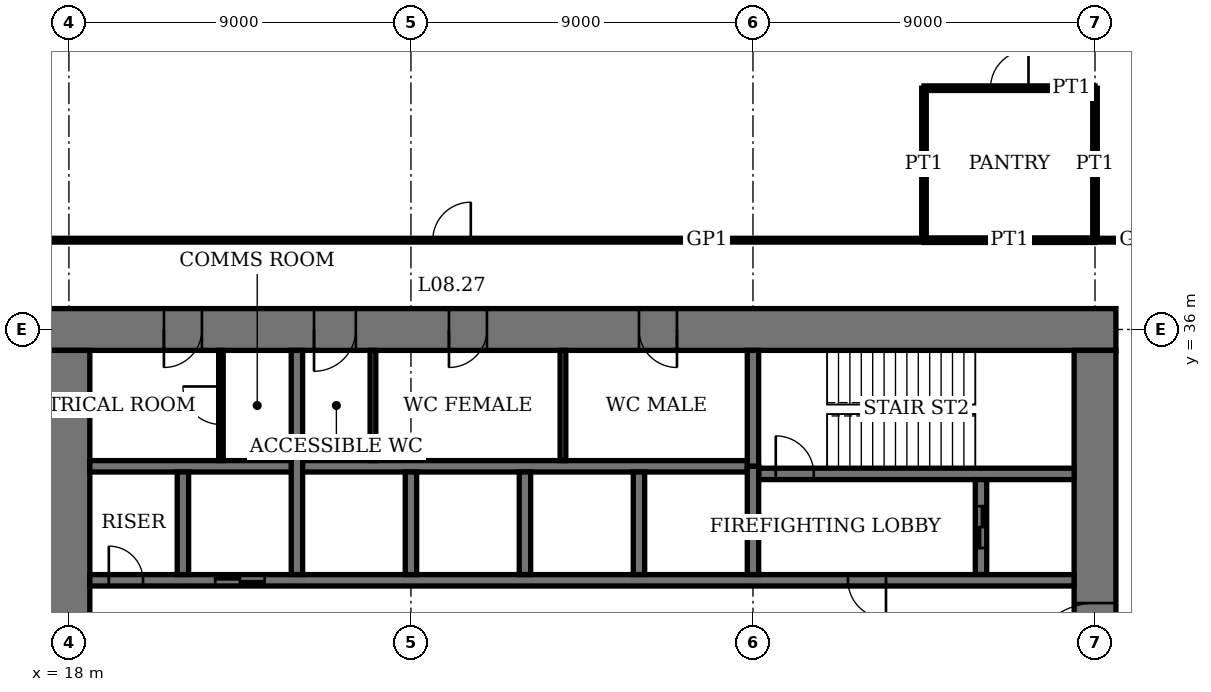
"""IFC4 building model, lengths in metres.
Left out: names, types, materials, properties, quantities, classifications, styles, units other than length and angle.
Written with IfcOpenShell. Run it as: python <this file> out.ifc"""

import sys

from ifc_helpers import new_model, si_unit, direction, frame, frame_2d, origin, place, context, subcontext, project, spatial, rectangle, extrude, element, fill, save


model = new_model("IFC4")
c1 = context("Model", 3, precision=1e-05, world=origin(), true_north=direction((0.0, 1.0)))
c2 = subcontext(c1, "Body", "Model", "MODEL_VIEW")
j1 = project(units=[si_unit("LENGTHUNIT", "METRE"), si_unit("PLANEANGLEUNIT", "RADIAN")], contexts=[c1])
p1 = place(None, origin())
s1 = spatial("IfcSite", under=j1, at=p1, CompositionType="ELEMENT")
p2 = place(p1, origin())
s2 = spatial("IfcBuilding", under=s1, at=p2, CompositionType="ELEMENT")
p3 = place(p2, frame((0.0, 0.0, 35.8)))
s3 = spatial("IfcBuildingStorey", under=s2, at=p3, CompositionType="ELEMENT", Elevation=35.8)
p4 = place(p3, frame((45.55, 36.0, 0.0), z_axis=(0.0, 0.0, 1.0), x_axis=(-1.0, 0.0, 0.0)))
e1 = element("IfcWall", 1, at=p4, inside=s3, PredefinedType="SHEAR", context=c2, shape_type="SweptSolid", body=[
    extrude(rectangle(XDim=28.1, YDim=1.1, at=frame_2d((14.05, 0.0))), origin(), (0.0, 0.0, 1.0), 4.0),
])
p5 = place(p4, frame((11.55, 0.0, 0.0)))
e2 = element("IfcOpeningElement", 2, at=p5, cuts=e1, PredefinedType="OPENING", context=c2, shape_type="SweptSolid", body=[
    extrude(rectangle(XDim=1.0, YDim=2.4, at=frame_2d((0.5, 1.2))), frame((0.0, 0.56, 0.0), z_axis=(0.0, -1.0, 0.0), x_axis=(1.0, 0.0, 0.0)), (0.0, 0.0, 1.0), 1.12),
])
p6 = place(p4, frame((16.55, 0.0, 0.0)))
e3 = element("IfcOpeningElement", 3, at=p6, cuts=e1, PredefinedType="OPENING", context=c2, shape_type="SweptSolid", body=[
    extrude(rectangle(XDim=1.0, YDim=2.4, at=frame_2d((0.5, 1.2))), frame((0.0, 0.56, 0.0), z_axis=(0.0, -1.0, 0.0), x_axis=(1.0, 0.0, 0.0)), (0.0, 0.0, 1.0), 1.12),
])
p7 = place(p4, frame((20.0, 0.0, 0.0)))
e4 = element("IfcOpeningElement", 4, at=p7, cuts=e1, PredefinedType="OPENING", context=c2, shape_type="SweptSolid", body=[
    extrude(rectangle(XDim=1.1, YDim=2.4, at=frame_2d((0.55, 1.2))), frame((0.0, 0.56, 0.0), z_axis=(0.0, -1.0, 0.0), x_axis=(1.0, 0.0, 0.0)), (0.0, 0.0, 1.0), 1.12),
])
p8 = place(p4, frame((24.05, 0.0, 0.0)))
e5 = element("IfcOpeningElement", 5, at=p8, cuts=e1, PredefinedType="OPENING", context=c2, shape_type="SweptSolid", body=[
    extrude(rectangle(XDim=1.0, YDim=2.4, at=frame_2d((0.5, 1.2))), frame((0.0, 0.56, 0.0), z_axis=(0.0, -1.0, 0.0), x_axis=(1.0, 0.0, 0.0)), (0.0, 0.0, 1.0), 1.12),
])
p9 = place(p3, frame((18.0, 35.45, 0.0), z_axis=(0.0, 0.0, 1.0), x_axis=(0.0, -1.0, 0.0)))
e6 = element("IfcWall", 6, at=p9, inside=s3, PredefinedType="SHEAR", context=c2, shape_type="SweptSolid", body=[
    extrude(rectangle(XDim=16.9, YDim=1.1, at=frame_2d((8.45, 0.0))), origin(), (0.0, 0.0, 1.0), 4.0),
])
p10 = place(p9, frame((8.45, 0.0, 0.0)))
e7 = element("IfcOpeningElement", 7, at=p10, cuts=e6, PredefinedType="OPENING", context=c2, shape_type="SweptSolid", body=[
    extrude(rectangle(XDim=1.8, YDim=2.4, at=frame_2d((0.9, 1.2))), frame((0.0, 0.56, 0.0), z_axis=(0.0, -1.0, 0.0), x_axis=(1.0, 0.0, 0.0)), (0.0, 0.0, 1.0), 1.12),
])
p11 = place(p3, frame((45.0, 18.55, 0.0), z_axis=(0.0, 0.0, 1.0), x_axis=(0.0, 1.0, 0.0)))
e8 = element("IfcWall", 8, at=p11, inside=s3, PredefinedType="SHEAR", context=c2, shape_type="SweptSolid", body=[
    extrude(rectangle(XDim=16.9, YDim=1.1, at=frame_2d((8.45, 0.0))), origin(), (0.0, 0.0, 1.0), 4.0),
])
p12 = place(p11, frame((8.45, 0.0, 0.0)))
e9 = element("IfcOpeningElement", 9, at=p12, cuts=e8, PredefinedType="OPENING", context=c2, shape_type="SweptSolid", body=[
    extrude(rectangle(XDim=1.8, YDim=2.4, at=frame_2d((0.9, 1.2))), frame((0.0, 0.56, 0.0), z_axis=(0.0, -1.0, 0.0), x_axis=(1.0, 0.0, 0.0)), (0.0, 0.0, 1.0), 1.12),
])
p13 = place(p3, frame((36.15, 32.2, 0.0), z_axis=(0.0, 0.0, 1.0), x_axis=(1.0, 0.0, 0.0)))
e10 = element("IfcWall", 10, at=p13, inside=s3, PredefinedType="SHEAR", context=c2, shape_type="SweptSolid", body=[
    extrude(rectangle(XDim=8.3, YDim=0.3, at=frame_2d((4.15, 0.0))), origin(), (0.0, 0.0, 1.0), 4.0),
])
p14 = place(p13, frame((0.45, 0.0, 0.0)))
e11 = element("IfcOpeningElement", 11, at=p14, cuts=e10, PredefinedType="OPENING", context=c2, shape_type="SweptSolid", body=[
    extrude(rectangle(XDim=1.0, YDim=2.4, at=frame_2d((0.5, 1.2))), frame((0.0, 0.16, 0.0), z_axis=(0.0, -1.0, 0.0), x_axis=(1.0, 0.0, 0.0)), (0.0, 0.0, 1.0), 0.32),
])
p15 = place(p3, frame((36.0, 32.4, 0.0), z_axis=(0.0, 0.0, 1.0), x_axis=(0.0, 1.0, 0.0)))
e12 = element("IfcWall", 12, at=p15, inside=s3, PredefinedType="SHEAR", context=c2, shape_type="SweptSolid", body=[
    extrude(rectangle(XDim=3.05, YDim=0.3, at=frame_2d((1.525, 0.0))), origin(), (0.0, 0.0, 1.0), 4.0),
])
p16 = place(p3, frame((42.0, 29.55, 0.0), z_axis=(0.0, 0.0, 1.0), x_axis=(0.0, 1.0, 0.0)))
e13 = element("IfcWall", 13, at=p16, inside=s3, PredefinedType="SHEAR", context=c2, shape_type="SweptSolid", body=[
    extrude(rectangle(XDim=2.5, YDim=0.3, at=frame_2d((1.25, 0.0))), origin(), (0.0, 0.0, 1.0), 4.0),
])
p17 = place(p16, frame((0.7, 0.0, 0.0)))
e14 = element("IfcOpeningElement", 14, at=p17, cuts=e13, PredefinedType="OPENING", context=c2, shape_type="SweptSolid", body=[
    extrude(rectangle(XDim=1.1, YDim=2.4, at=frame_2d((0.55, 1.2))), frame((0.0, 0.16, 0.0), z_axis=(0.0, -1.0, 0.0), x_axis=(1.0, 0.0, 0.0)), (0.0, 0.0, 1.0), 0.32),
])
p18 = place(p3, frame((18.55, 29.4, 0.0), z_axis=(0.0, 0.0, 1.0), x_axis=(1.0, 0.0, 0.0)))
e15 = element("IfcWall", 15, at=p18, inside=s3, PredefinedType="SHEAR", context=c2, shape_type="SweptSolid", body=[
    extrude(rectangle(XDim=25.9, YDim=0.3, at=frame_2d((12.95, 0.0))), origin(), (0.0, 0.0, 1.0), 4.0),
])
p19 = place(p18, frame((19.95, 0.0, 0.0)))
e16 = element("IfcOpeningElement", 16, at=p19, cuts=e15, PredefinedType="OPENING", context=c2, shape_type="SweptSolid", body=[
    extrude(rectangle(XDim=1.0, YDim=2.4, at=frame_2d((0.5, 1.2))), frame((0.0, 0.16, 0.0), z_axis=(0.0, -1.0, 0.0), x_axis=(1.0, 0.0, 0.0)), (0.0, 0.0, 1.0), 0.32),
])
p20 = place(p18, frame((0.5, 0.0, 0.0)))
e17 = element("IfcOpeningElement", 17, at=p20, cuts=e15, PredefinedType="OPENING", context=c2, shape_type="SweptSolid", body=[
    extrude(rectangle(XDim=0.9, YDim=2.1, at=frame_2d((0.45, 1.05))), frame((0.0, 0.16, 0.0), z_axis=(0.0, -1.0, 0.0), x_axis=(1.0, 0.0, 0.0)), (0.0, 0.0, 1.0), 0.32),
])
p21 = place(p18, frame((3.3, 0.0, 0.0)))
e18 = element("IfcOpeningElement", 18, at=p21, cuts=e15, PredefinedType="OPENING", context=c2, shape_type="SweptSolid", body=[
    extrude(rectangle(XDim=1.3, YDim=2.4, at=frame_2d((0.65, 1.2))), frame((0.0, 0.16, 0.0), z_axis=(0.0, -1.0, 0.0), x_axis=(1.0, 0.0, 0.0)), (0.0, 0.0, 1.0), 0.32),
])
p22 = place(p3, frame((18.55, 32.4, 0.0), z_axis=(0.0, 0.0, 1.0), x_axis=(1.0, 0.0, 0.0)))
e19 = element("IfcWall", 19, at=p22, inside=s3, PredefinedType="SHEAR", context=c2, shape_type="SweptSolid", body=[
    extrude(rectangle(XDim=17.3, YDim=0.3, at=frame_2d((8.65, 0.0))), origin(), (0.0, 0.0, 1.0), 4.0),
])
for number, where, z_axis, x_axis in (
    (20, (33.0, 29.55, 0.0), (0.0, 0.0, 1.0), (0.0, 1.0, 0.0)),
    (21, (30.0, 29.55, 0.0), (0.0, 0.0, 1.0), (0.0, 1.0, 0.0)),
    (22, (27.0, 29.55, 0.0), (0.0, 0.0, 1.0), (0.0, 1.0, 0.0)),
):
    element("IfcWall", number, at=place(p3, frame(where, z_axis=z_axis, x_axis=x_axis)), inside=s3, PredefinedType="SHEAR", context=c2, shape_type="SweptSolid", body=[
        extrude(rectangle(XDim=2.7, YDim=0.3, at=frame_2d((1.35, 0.0))), origin(), (0.0, 0.0, 1.0), 4.0),
    ])
p23 = place(p3, frame((24.0, 29.55, 0.0), z_axis=(0.0, 0.0, 1.0), x_axis=(0.0, 1.0, 0.0)))
e23 = element("IfcWall", 23, at=p23, inside=s3, PredefinedType="SHEAR", context=c2, shape_type="SweptSolid", body=[
    extrude(rectangle(XDim=5.9, YDim=0.3, at=frame_2d((2.95, 0.0))), origin(), (0.0, 0.0, 1.0), 4.0),
])
p24 = place(p3, frame((21.0, 29.55, 0.0), z_axis=(0.0, 0.0, 1.0), x_axis=(0.0, 1.0, 0.0)))
e24 = element("IfcWall", 24, at=p24, inside=s3, PredefinedType="SHEAR", context=c2, shape_type="SweptSolid", body=[
    extrude(rectangle(XDim=2.7, YDim=0.3, at=frame_2d((1.35, 0.0))), origin(), (0.0, 0.0, 1.0), 4.0),
])
p25 = place(p3, frame((36.0, 29.55, 0.0), z_axis=(0.0, 0.0, 1.0), x_axis=(0.0, 1.0, 0.0)))
e25 = element("IfcWall", 25, at=p25, inside=s3, PredefinedType="SHEAR", context=c2, shape_type="SweptSolid", body=[
    extrude(rectangle(XDim=2.85, YDim=0.3, at=frame_2d((1.425, 0.0))), origin(), (0.0, 0.0, 1.0), 4.0),
])
p26 = place(p3, frame((40.5, 38.35, 0.0), z_axis=(0.0, 0.0, 1.0), x_axis=(1.0, 0.0, 0.0)))
e26 = element("IfcWall", 26, at=p26, inside=s3, PredefinedType="PARTITIONING", context=c2, shape_type="SweptSolid", body=[
    extrude(rectangle(XDim=4.5, YDim=0.12, at=frame_2d((2.25, 0.0))), origin(), (0.0, 0.0, 1.0), 3.75),
])
p27 = place(p3, frame((15.65, 38.35, 0.0), z_axis=(0.0, 0.0, 1.0), x_axis=(1.0, 0.0, 0.0)))
e27 = element("IfcWall", 27, at=p27, inside=s3, PredefinedType="PARTITIONING", context=c2, shape_type="SweptSolid", body=[
    extrude(rectangle(XDim=24.85, YDim=0.1, at=frame_2d((12.425, 0.0))), origin(), (0.0, 0.0, 1.0), 3.75),
])
p28 = place(p27, frame((11.925, 0.0, 0.0)))
e28 = element("IfcOpeningElement", 28, at=p28, cuts=e27, PredefinedType="OPENING", context=c2, shape_type="SweptSolid", body=[
    extrude(rectangle(XDim=1.0, YDim=2.4, at=frame_2d((0.5, 1.2))), frame((0.0, 0.06, 0.0), z_axis=(0.0, -1.0, 0.0), x_axis=(1.0, 0.0, 0.0)), (0.0, 0.0, 1.0), 0.12),
])
p29 = place(p3, frame((45.0, 38.35, 0.0), z_axis=(0.0, 0.0, 1.0), x_axis=(1.0, 0.0, 0.0)))
e29 = element("IfcWall", 29, at=p29, inside=s3, PredefinedType="PARTITIONING", context=c2, shape_type="SweptSolid", body=[
    extrude(rectangle(XDim=2.35, YDim=0.1, at=frame_2d((1.175, 0.0))), origin(), (0.0, 0.0, 1.0), 3.75),
])
p30 = place(p3, frame((40.5, 42.35, 0.0), z_axis=(0.0, 0.0, 1.0), x_axis=(1.0, 0.0, 0.0)))
e30 = element("IfcWall", 30, at=p30, inside=s3, PredefinedType="PARTITIONING", context=c2, shape_type="SweptSolid", body=[
    extrude(rectangle(XDim=4.5, YDim=0.12, at=frame_2d((2.25, 0.0))), origin(), (0.0, 0.0, 1.0), 3.75),
])
p31 = place(p30, frame((1.75, 0.0, 0.0)))
e31 = element("IfcOpeningElement", 31, at=p31, cuts=e30, PredefinedType="OPENING", context=c2, shape_type="SweptSolid", body=[
    extrude(rectangle(XDim=1.0, YDim=2.4, at=frame_2d((0.5, 1.2))), frame((0.0, 0.07, 0.0), z_axis=(0.0, -1.0, 0.0), x_axis=(1.0, 0.0, 0.0)), (0.0, 0.0, 1.0), 0.14),
])
p32 = place(p3, frame((40.5, 38.35, 0.0), z_axis=(0.0, 0.0, 1.0), x_axis=(0.0, 1.0, 0.0)))
e32 = element("IfcWall", 32, at=p32, inside=s3, PredefinedType="PARTITIONING", context=c2, shape_type="SweptSolid", body=[
    extrude(rectangle(XDim=4.0, YDim=0.12, at=frame_2d((2.0, 0.0))), origin(), (0.0, 0.0, 1.0), 3.75),
])
p33 = place(p3, frame((45.0, 38.35, 0.0), z_axis=(0.0, 0.0, 1.0), x_axis=(0.0, 1.0, 0.0)))
e33 = element("IfcWall", 33, at=p33, inside=s3, PredefinedType="PARTITIONING", context=c2, shape_type="SweptSolid", body=[
    extrude(rectangle(XDim=4.0, YDim=0.12, at=frame_2d((2.0, 0.0))), origin(), (0.0, 0.0, 1.0), 3.05),
])
for number, where, z_axis, x_axis in (
    (34, (31.0, 32.55, 0.0), (0.0, 0.0, 1.0), (0.0, 1.0, 0.0)),
    (35, (26.0, 32.55, 0.0), (0.0, 0.0, 1.0), (0.0, 1.0, 0.0)),
):
    element("IfcWall", number, at=place(p3, frame(where, z_axis=z_axis, x_axis=x_axis)), inside=s3, PredefinedType="PARTITIONING", context=c2, shape_type="SweptSolid", body=[
        extrude(rectangle(XDim=2.9, YDim=0.15, at=frame_2d((1.45, 0.0))), origin(), (0.0, 0.0, 1.0), 3.75),
    ])
p34 = place(p3, frame((22.0, 32.55, 0.0), z_axis=(0.0, 0.0, 1.0), x_axis=(0.0, 1.0, 0.0)))
e36 = element("IfcWall", 36, at=p34, inside=s3, PredefinedType="PARTITIONING", context=c2, shape_type="SweptSolid", body=[
    extrude(rectangle(XDim=2.9, YDim=0.12, at=frame_2d((1.45, 0.0))), origin(), (0.0, 0.0, 1.0), 3.75),
])
p35 = place(p34, frame((0.95, 0.0, 0.0)))
e37 = element("IfcOpeningElement", 37, at=p35, cuts=e36, PredefinedType="OPENING", context=c2, shape_type="SweptSolid", body=[
    extrude(rectangle(XDim=1.0, YDim=2.4, at=frame_2d((0.5, 1.2))), frame((0.0, 0.07, 0.0), z_axis=(0.0, -1.0, 0.0), x_axis=(1.0, 0.0, 0.0)), (0.0, 0.0, 1.0), 0.14),
])
p36 = place(p12, origin())
e38 = element("IfcDoor", 38, at=p36, inside=s3, OperationType="DOUBLE_DOOR_DOUBLE_SWING", PredefinedType="DOOR", context=c2, shape_type="SweptSolid", body=[
    extrude(rectangle(XDim=1.8, YDim=2.4, at=frame_2d((0.9, 1.2))), frame((0.0, 0.03, 0.0), z_axis=(0.0, -1.0, 0.0), x_axis=(1.0, 0.0, 0.0)), (0.0, 0.0, 1.0), 0.06),
    extrude(rectangle(XDim=0.04, YDim=2.4, at=frame_2d((0.02, 1.2))), frame((0.0, 0.55, 0.0), z_axis=(0.0, -1.0, 0.0), x_axis=(1.0, 0.0, 0.0)), (0.0, 0.0, 1.0), 1.1),
    extrude(rectangle(XDim=0.04, YDim=2.4, at=frame_2d((1.78, 1.2))), frame((0.0, 0.55, 0.0), z_axis=(0.0, -1.0, 0.0), x_axis=(1.0, 0.0, 0.0)), (0.0, 0.0, 1.0), 1.1),
    extrude(rectangle(XDim=1.8, YDim=0.04, at=frame_2d((0.9, 2.38))), frame((0.0, 0.55, 0.0), z_axis=(0.0, -1.0, 0.0), x_axis=(1.0, 0.0, 0.0)), (0.0, 0.0, 1.0), 1.1),
])
fill(e9, e38)
p37 = place(p5, origin())
e39 = element("IfcDoor", 39, at=p37, inside=s3, OperationType="SINGLE_SWING_RIGHT", PredefinedType="DOOR", context=c2, shape_type="SweptSolid", body=[
    extrude(rectangle(XDim=1.0, YDim=2.4, at=frame_2d((0.5, 1.2))), frame((0.0, 0.025, 0.0), z_axis=(0.0, -1.0, 0.0), x_axis=(1.0, 0.0, 0.0)), (0.0, 0.0, 1.0), 0.05),
    extrude(rectangle(XDim=0.04, YDim=2.4, at=frame_2d((0.02, 1.2))), frame((0.0, 0.4, 0.0), z_axis=(0.0, -1.0, 0.0), x_axis=(1.0, 0.0, 0.0)), (0.0, 0.0, 1.0), 0.8),
    extrude(rectangle(XDim=0.04, YDim=2.4, at=frame_2d((0.98, 1.2))), frame((0.0, 0.4, 0.0), z_axis=(0.0, -1.0, 0.0), x_axis=(1.0, 0.0, 0.0)), (0.0, 0.0, 1.0), 0.8),
    extrude(rectangle(XDim=1.0, YDim=0.04, at=frame_2d((0.5, 2.38))), frame((0.0, 0.4, 0.0), z_axis=(0.0, -1.0, 0.0), x_axis=(1.0, 0.0, 0.0)), (0.0, 0.0, 1.0), 0.8),
])
fill(e2, e39)
p38 = place(p6, origin())
e40 = element("IfcDoor", 40, at=p38, inside=s3, OperationType="SINGLE_SWING_LEFT", PredefinedType="DOOR", context=c2, shape_type="SweptSolid", body=[
    extrude(rectangle(XDim=1.0, YDim=2.4, at=frame_2d((0.5, 1.2))), frame((0.0, 0.025, 0.0), z_axis=(0.0, -1.0, 0.0), x_axis=(1.0, 0.0, 0.0)), (0.0, 0.0, 1.0), 0.05),
    extrude(rectangle(XDim=0.04, YDim=2.4, at=frame_2d((0.02, 1.2))), frame((0.0, 0.4, 0.0), z_axis=(0.0, -1.0, 0.0), x_axis=(1.0, 0.0, 0.0)), (0.0, 0.0, 1.0), 0.8),
    extrude(rectangle(XDim=0.04, YDim=2.4, at=frame_2d((0.98, 1.2))), frame((0.0, 0.4, 0.0), z_axis=(0.0, -1.0, 0.0), x_axis=(1.0, 0.0, 0.0)), (0.0, 0.0, 1.0), 0.8),
    extrude(rectangle(XDim=1.0, YDim=0.04, at=frame_2d((0.5, 2.38))), frame((0.0, 0.4, 0.0), z_axis=(0.0, -1.0, 0.0), x_axis=(1.0, 0.0, 0.0)), (0.0, 0.0, 1.0), 0.8),
])
fill(e3, e40)
p39 = place(p7, origin())
e41 = element("IfcDoor", 41, at=p39, inside=s3, OperationType="SINGLE_SWING_LEFT", PredefinedType="DOOR", context=c2, shape_type="SweptSolid", body=[
    extrude(rectangle(XDim=1.1, YDim=2.4, at=frame_2d((0.55, 1.2))), frame((0.0, 0.025, 0.0), z_axis=(0.0, -1.0, 0.0), x_axis=(1.0, 0.0, 0.0)), (0.0, 0.0, 1.0), 0.05),
    extrude(rectangle(XDim=0.04, YDim=2.4, at=frame_2d((0.02, 1.2))), frame((0.0, 0.44, 0.0), z_axis=(0.0, -1.0, 0.0), x_axis=(1.0, 0.0, 0.0)), (0.0, 0.0, 1.0), 0.88),
    extrude(rectangle(XDim=0.04, YDim=2.4, at=frame_2d((1.08, 1.2))), frame((0.0, 0.44, 0.0), z_axis=(0.0, -1.0, 0.0), x_axis=(1.0, 0.0, 0.0)), (0.0, 0.0, 1.0), 0.88),
    extrude(rectangle(XDim=1.1, YDim=0.04, at=frame_2d((0.55, 2.38))), frame((0.0, 0.44, 0.0), z_axis=(0.0, -1.0, 0.0), x_axis=(1.0, 0.0, 0.0)), (0.0, 0.0, 1.0), 0.88),
])
fill(e4, e41)
p40 = place(p8, origin())
e42 = element("IfcDoor", 42, at=p40, inside=s3, OperationType="SINGLE_SWING_LEFT", PredefinedType="DOOR", context=c2, shape_type="SweptSolid", body=[
    extrude(rectangle(XDim=1.0, YDim=2.4, at=frame_2d((0.5, 1.2))), frame((0.0, 0.025, 0.0), z_axis=(0.0, -1.0, 0.0), x_axis=(1.0, 0.0, 0.0)), (0.0, 0.0, 1.0), 0.05),
    extrude(rectangle(XDim=0.04, YDim=2.4, at=frame_2d((0.02, 1.2))), frame((0.0, 0.4, 0.0), z_axis=(0.0, -1.0, 0.0), x_axis=(1.0, 0.0, 0.0)), (0.0, 0.0, 1.0), 0.8),
    extrude(rectangle(XDim=0.04, YDim=2.4, at=frame_2d((0.98, 1.2))), frame((0.0, 0.4, 0.0), z_axis=(0.0, -1.0, 0.0), x_axis=(1.0, 0.0, 0.0)), (0.0, 0.0, 1.0), 0.8),
    extrude(rectangle(XDim=1.0, YDim=0.04, at=frame_2d((0.5, 2.38))), frame((0.0, 0.4, 0.0), z_axis=(0.0, -1.0, 0.0), x_axis=(1.0, 0.0, 0.0)), (0.0, 0.0, 1.0), 0.8),
])
fill(e5, e42)
p41 = place(p14, origin())
e43 = element("IfcDoor", 43, at=p41, inside=s3, OperationType="SINGLE_SWING_RIGHT", PredefinedType="DOOR", context=c2, shape_type="SweptSolid", body=[
    extrude(rectangle(XDim=1.0, YDim=2.4, at=frame_2d((0.5, 1.2))), frame((0.0, 0.03, 0.0), z_axis=(0.0, -1.0, 0.0), x_axis=(1.0, 0.0, 0.0)), (0.0, 0.0, 1.0), 0.06),
])
fill(e11, e43)
p42 = place(p19, origin())
e44 = element("IfcDoor", 44, at=p42, inside=s3, OperationType="SINGLE_SWING_RIGHT", PredefinedType="DOOR", context=c2, shape_type="SweptSolid", body=[
    extrude(rectangle(XDim=1.0, YDim=2.4, at=frame_2d((0.5, 1.2))), frame((0.0, 0.03, 0.0), z_axis=(0.0, -1.0, 0.0), x_axis=(1.0, 0.0, 0.0)), (0.0, 0.0, 1.0), 0.06),
])
fill(e16, e44)
p43 = place(p20, origin())
e45 = element("IfcDoor", 45, at=p43, inside=s3, OperationType="SINGLE_SWING_RIGHT", PredefinedType="DOOR", context=c2, shape_type="SweptSolid", body=[
    extrude(rectangle(XDim=0.9, YDim=2.1, at=frame_2d((0.45, 1.05))), frame((0.0, 0.03, 0.0), z_axis=(0.0, -1.0, 0.0), x_axis=(1.0, 0.0, 0.0)), (0.0, 0.0, 1.0), 0.06),
])
fill(e17, e45)
p44 = place(p28, origin())
e46 = element("IfcDoor", 46, at=p44, inside=s3, OperationType="SINGLE_SWING_LEFT", PredefinedType="DOOR", context=c2, shape_type="SweptSolid", body=[
    extrude(rectangle(XDim=1.0, YDim=2.4, at=frame_2d((0.5, 1.2))), frame((0.0, 0.02, 0.0), z_axis=(0.0, -1.0, 0.0), x_axis=(1.0, 0.0, 0.0)), (0.0, 0.0, 1.0), 0.04),
])
fill(e28, e46)
p45 = place(p31, origin())
e47 = element("IfcDoor", 47, at=p45, inside=s3, OperationType="SINGLE_SWING_LEFT", PredefinedType="DOOR", context=c2, shape_type="SweptSolid", body=[
    extrude(rectangle(XDim=1.0, YDim=2.4, at=frame_2d((0.5, 1.2))), frame((0.0, 0.025, 0.0), z_axis=(0.0, -1.0, 0.0), x_axis=(1.0, 0.0, 0.0)), (0.0, 0.0, 1.0), 0.05),
])
fill(e31, e47)
p46 = place(p35, origin())
e48 = element("IfcDoor", 48, at=p46, inside=s3, OperationType="SINGLE_SWING_LEFT", PredefinedType="DOOR", context=c2, shape_type="SweptSolid", body=[
    extrude(rectangle(XDim=1.0, YDim=2.4, at=frame_2d((0.5, 1.2))), frame((0.0, 0.03, 0.0), z_axis=(0.0, -1.0, 0.0), x_axis=(1.0, 0.0, 0.0)), (0.0, 0.0, 1.0), 0.06),
])
fill(e37, e48)
p47 = place(p21, origin())
e49 = element("IfcDoor", 49, at=p47, inside=s3, OperationType="DOUBLE_DOOR_SLIDING", PredefinedType="DOOR", context=c2, shape_type="SweptSolid", body=[
    extrude(rectangle(XDim=1.3, YDim=2.4, at=frame_2d((0.65, 1.2))), frame((0.0, 0.02, 0.0), z_axis=(0.0, -1.0, 0.0), x_axis=(1.0, 0.0, 0.0)), (0.0, 0.0, 1.0), 0.04),
])
fill(e18, e49)
p48 = place(p17, origin())
e50 = element("IfcDoor", 50, at=p48, inside=s3, OperationType="DOUBLE_DOOR_SLIDING", PredefinedType="DOOR", context=c2, shape_type="SweptSolid", body=[
    extrude(rectangle(XDim=1.1, YDim=2.4, at=frame_2d((0.55, 1.2))), frame((0.0, 0.03, 0.0), z_axis=(0.0, -1.0, 0.0), x_axis=(1.0, 0.0, 0.0)), (0.0, 0.0, 1.0), 0.06),
])
fill(e14, e50)
save(model, sys.argv[1])
